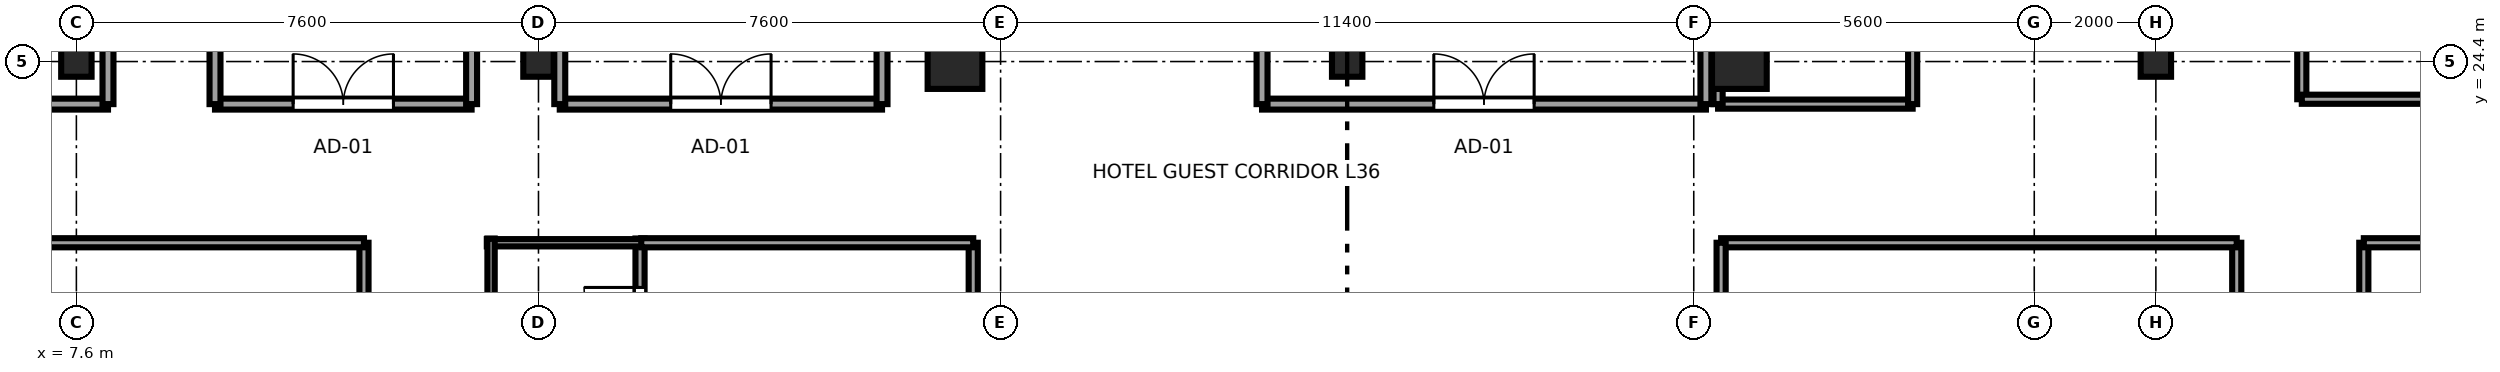
"""IFC4 building model, lengths in metres.
Left out: names, types, materials, properties, quantities, classifications, styles, units other than length and angle.
Written with IfcOpenShell. Run it as: python <this file> out.ifc"""

import sys

from ifc_helpers import new_model, si_unit, direction, frame, frame_2d, origin, origin_2d, place, context, subcontext, project, spatial, rectangle, i_section, extrude, source, transform, mapped, element, fill, save


model = new_model("IFC4")
c1 = context("Model", 3, precision=1e-05, world=origin(), true_north=direction((0.0, 1.0)))
c2 = subcontext(c1, "Body", "Model", "MODEL_VIEW")
j1 = project(units=[si_unit("LENGTHUNIT", "METRE"), si_unit("PLANEANGLEUNIT", "RADIAN")], contexts=[c1])
p1 = place(None, origin())
s1 = spatial("IfcSite", under=j1, at=p1, CompositionType="ELEMENT")
p2 = place(p1, origin())
s2 = spatial("IfcBuilding", under=s1, at=p2, CompositionType="ELEMENT")
p3 = place(p2, frame((0.0, 0.0, 139.95)))
s3 = spatial("IfcBuildingStorey", under=s2, at=p3, CompositionType="ELEMENT", Elevation=139.95)
m1 = source(origin(), c2, "Body", "SweptSolid", [
    extrude(i_section(OverallWidth=0.5, OverallDepth=0.5, WebThickness=0.022, FlangeThickness=0.034, at=origin_2d()), origin(), (0.0, 0.0, 1.0), 3.55),
])
for number, where, z_axis, x_axis in (
    (1, (7.6, 24.4, 0.0), (0.0, 0.0, 1.0), (1.0, 0.0, 0.0)),
    (2, (15.2, 24.4, 0.0), (0.0, 0.0, 1.0), (1.0, 0.0, 0.0)),
):
    element("IfcColumn", number, at=place(p3, frame(where, z_axis=z_axis, x_axis=x_axis)), inside=s3, PredefinedType="COLUMN", context=c2, shape_type="MappedRepresentation", body=[
        mapped(m1, transform((0.0, 0.0, 0.0), x_axis=(1.0, 0.0, 0.0), y_axis=(0.0, 1.0, 0.0), z_axis=(0.0, 0.0, 1.0), scale=1.0)),
    ])
m2 = source(origin(), c2, "Body", "SweptSolid", [
    extrude(rectangle(XDim=0.9, YDim=0.9, at=origin_2d()), origin(), (0.0, 0.0, 1.0), 3.55),
])
for number, where, z_axis, x_axis in (
    (3, (22.05, 24.4, 0.0), (0.0, 0.0, 1.0), (1.0, 0.0, 0.0)),
    (4, (34.95, 24.4, 0.0), (0.0, 0.0, 1.0), (1.0, 0.0, 0.0)),
):
    element("IfcColumn", number, at=place(p3, frame(where, z_axis=z_axis, x_axis=x_axis)), inside=s3, PredefinedType="COLUMN", context=c2, shape_type="MappedRepresentation", body=[
        mapped(m2, transform((0.0, 0.0, 0.0), x_axis=(1.0, 0.0, 0.0), y_axis=(0.0, 1.0, 0.0), z_axis=(0.0, 0.0, 1.0), scale=1.0)),
    ])
for number, where, z_axis, x_axis in (
    (5, (41.8, 24.4, 0.0), (0.0, 0.0, 1.0), (1.0, 0.0, 0.0)),
    (6, (28.5, 24.4, 0.0), (0.0, 0.0, 1.0), (1.0, 0.0, 0.0)),
):
    element("IfcColumn", number, at=place(p3, frame(where, z_axis=z_axis, x_axis=x_axis)), inside=s3, PredefinedType="COLUMN", context=c2, shape_type="MappedRepresentation", body=[
        mapped(m1, transform((0.0, 0.0, 0.0), x_axis=(1.0, 0.0, 0.0), y_axis=(0.0, 1.0, 0.0), z_axis=(0.0, 0.0, 1.0), scale=1.0)),
    ])
p4 = place(p3, frame((16.87, 19.1, 0.0), z_axis=(0.0, 0.0, 1.0), x_axis=(0.0, 1.0, 0.0)))
e7 = element("IfcWall", 7, at=p4, inside=s3, PredefinedType="PARTITIONING", context=c2, shape_type="SweptSolid", body=[
    extrude(rectangle(XDim=2.39, YDim=0.15, at=frame_2d((1.195, 0.0))), origin(), (0.0, 0.0, 1.0), 3.37),
])
p5 = place(p4, frame((0.665, 0.0, 0.0)))
e8 = element("IfcOpeningElement", 8, at=p5, cuts=e7, PredefinedType="OPENING", context=c2, shape_type="SweptSolid", body=[
    extrude(rectangle(XDim=0.92, YDim=2.01, at=frame_2d((0.46, 1.005))), frame((0.0, 0.085, 0.0), z_axis=(0.0, -1.0, 0.0), x_axis=(1.0, 0.0, 0.0)), (0.0, 0.0, 1.0), 0.17),
])
p6 = place(p3, frame((14.35, 21.42, 0.0), z_axis=(0.0, 0.0, 1.0), x_axis=(1.0, 0.0, 0.0)))
e9 = element("IfcWall", 9, at=p6, inside=s3, PredefinedType="PLUMBINGWALL", context=c2, shape_type="SweptSolid", body=[
    extrude(rectangle(XDim=2.59, YDim=0.12, at=frame_2d((1.295, 0.0))), origin(), (0.0, 0.0, 1.0), 3.37),
])
p7 = place(p3, frame((14.42, 19.1, 0.0), z_axis=(0.0, 0.0, 1.0), x_axis=(0.0, 1.0, 0.0)))
e10 = element("IfcWall", 10, at=p7, inside=s3, PredefinedType="PLUMBINGWALL", context=c2, shape_type="SweptSolid", body=[
    extrude(rectangle(XDim=2.39, YDim=0.12, at=frame_2d((1.195, 0.0))), origin(), (0.0, 0.0, 1.0), 3.37),
])
p8 = place(p3, frame((12.33, 13.21, 0.0), z_axis=(0.0, 0.0, 1.0), x_axis=(0.0, 1.0, 0.0)))
e11 = element("IfcWall", 11, at=p8, inside=s3, PredefinedType="PARTITIONING", context=c2, shape_type="SweptSolid", body=[
    extrude(rectangle(XDim=8.21, YDim=0.15, at=frame_2d((4.105, 0.0))), origin(), (0.0, 0.0, 1.0), 3.37),
])
p9 = place(p8, frame((3.595, 0.0, 0.0)))
e12 = element("IfcOpeningElement", 12, at=p9, cuts=e11, PredefinedType="OPENING", context=c2, shape_type="SweptSolid", body=[
    extrude(rectangle(XDim=0.98, YDim=2.12, at=frame_2d((0.49, 1.06))), frame((0.0, 0.085, 0.0), z_axis=(0.0, -1.0, 0.0), x_axis=(1.0, 0.0, 0.0)), (0.0, 0.0, 1.0), 0.17),
])
p10 = place(p3, frame((0.405, 21.42, 0.0), z_axis=(0.0, 0.0, 1.0), x_axis=(1.0, 0.0, 0.0)))
e13 = element("IfcWall", 13, at=p10, inside=s3, PredefinedType="PARTITIONING", context=c2, shape_type="SweptSolid", body=[
    extrude(rectangle(XDim=11.925, YDim=0.15, at=frame_2d((5.962, 0.0))), origin(), (0.0, 0.0, 1.0), 3.37),
])
p11 = place(p3, frame((22.35, 14.48, 0.0), z_axis=(0.0, 0.0, 1.0), x_axis=(0.0, 1.0, 0.0)))
e14 = element("IfcWall", 14, at=p11, inside=s3, PredefinedType="PARTITIONING", context=c2, shape_type="SweptSolid", body=[
    extrude(rectangle(XDim=6.94, YDim=0.15, at=frame_2d((3.47, 0.0))), origin(), (0.0, 0.0, 1.0), 3.37),
])
p12 = place(p3, frame((16.89, 21.42, 0.0), z_axis=(0.0, 0.0, 1.0), x_axis=(1.0, 0.0, 0.0)))
e15 = element("IfcWall", 15, at=p12, inside=s3, PredefinedType="PARTITIONING", context=c2, shape_type="SweptSolid", body=[
    extrude(rectangle(XDim=5.46, YDim=0.15, at=frame_2d((2.73, 0.0))), origin(), (0.0, 0.0, 1.0), 3.37),
])
p13 = place(p3, frame((43.13, 13.21, 0.0), z_axis=(0.0, 0.0, 1.0), x_axis=(0.0, 1.0, 0.0)))
e16 = element("IfcWall", 16, at=p13, inside=s3, PredefinedType="PARTITIONING", context=c2, shape_type="SweptSolid", body=[
    extrude(rectangle(XDim=8.21, YDim=0.15, at=frame_2d((4.105, 0.0))), origin(), (0.0, 0.0, 1.0), 3.37),
])
p14 = place(p13, frame((3.595, 0.0, 0.0)))
e17 = element("IfcOpeningElement", 17, at=p14, cuts=e16, PredefinedType="OPENING", context=c2, shape_type="SweptSolid", body=[
    extrude(rectangle(XDim=0.98, YDim=2.12, at=frame_2d((0.49, 1.06))), frame((0.0, 0.085, 0.0), z_axis=(0.0, -1.0, 0.0), x_axis=(1.0, 0.0, 0.0)), (0.0, 0.0, 1.0), 0.17),
])
p15 = place(p3, frame((34.65, 21.42, 0.0), z_axis=(0.0, 0.0, 1.0), x_axis=(1.0, 0.0, 0.0)))
e18 = element("IfcWall", 18, at=p15, inside=s3, PredefinedType="PARTITIONING", context=c2, shape_type="SweptSolid", body=[
    extrude(rectangle(XDim=8.48, YDim=0.15, at=frame_2d((4.24, 0.0))), origin(), (0.0, 0.0, 1.0), 3.37),
])
p16 = place(p3, frame((34.65, 10.88, 0.0), z_axis=(0.0, 0.0, 1.0), x_axis=(0.0, 1.0, 0.0)))
e19 = element("IfcWall", 19, at=p16, inside=s3, PredefinedType="PARTITIONING", context=c2, shape_type="SweptSolid", body=[
    extrude(rectangle(XDim=10.54, YDim=0.15, at=frame_2d((5.27, 0.0))), origin(), (0.0, 0.0, 1.0), 3.37),
])
p17 = place(p3, frame((45.22, 16.81, 0.0), z_axis=(0.0, 0.0, 1.0), x_axis=(0.0, 1.0, 0.0)))
e20 = element("IfcWall", 20, at=p17, inside=s3, PredefinedType="PARTITIONING", context=c2, shape_type="SweptSolid", body=[
    extrude(rectangle(XDim=4.61, YDim=0.15, at=frame_2d((2.305, 0.0))), origin(), (0.0, 0.0, 1.0), 3.37),
])
p18 = place(p17, frame((1.795, 0.0, 0.0)))
e21 = element("IfcOpeningElement", 21, at=p18, cuts=e20, PredefinedType="OPENING", context=c2, shape_type="SweptSolid", body=[
    extrude(rectangle(XDim=0.98, YDim=2.12, at=frame_2d((0.49, 1.06))), frame((0.0, 0.085, 0.0), z_axis=(0.0, -1.0, 0.0), x_axis=(1.0, 0.0, 0.0)), (0.0, 0.0, 1.0), 0.17),
])
p19 = place(p3, frame((45.22, 21.42, 0.0), z_axis=(0.0, 0.0, 1.0), x_axis=(1.0, 0.0, 0.0)))
e22 = element("IfcWall", 22, at=p19, inside=s3, PredefinedType="PARTITIONING", context=c2, shape_type="SweptSolid", body=[
    extrude(rectangle(XDim=11.375, YDim=0.15, at=frame_2d((5.688, 0.0))), origin(), (0.0, 0.0, 1.0), 3.37),
])
p20 = place(p3, frame((0.405, 23.7, 0.0), z_axis=(0.0, 0.0, 1.0), x_axis=(1.0, 0.0, 0.0)))
e23 = element("IfcWall", 23, at=p20, inside=s3, PredefinedType="PARTITIONING", context=c2, shape_type="SweptSolid", body=[
    extrude(rectangle(XDim=7.715, YDim=0.18, at=frame_2d((3.857, 0.0))), origin(), (0.0, 0.0, 1.0), 3.37),
])
p21 = place(p3, frame((8.12, 23.7, 0.0), z_axis=(0.0, 0.0, 1.0), x_axis=(0.0, 1.0, 0.0)))
e24 = element("IfcWall", 24, at=p21, inside=s3, PredefinedType="PARTITIONING", context=c2, shape_type="SweptSolid", body=[
    extrude(rectangle(XDim=7.5, YDim=0.18, at=frame_2d((3.75, 0.0))), origin(), (0.0, 0.0, 1.0), 3.37),
])
p22 = place(p21, frame((2.925, 0.0, 0.0)))
e25 = element("IfcOpeningElement", 25, at=p22, cuts=e24, PredefinedType="OPENING", context=c2, shape_type="SweptSolid", body=[
    extrude(rectangle(XDim=1.65, YDim=2.15, at=frame_2d((0.825, 1.075))), frame((0.0, 0.1, 0.0), z_axis=(0.0, -1.0, 0.0), x_axis=(1.0, 0.0, 0.0)), (0.0, 0.0, 1.0), 0.2),
])
p23 = place(p3, frame((44.2, 23.78, 0.0), z_axis=(0.0, 0.0, 1.0), x_axis=(0.0, 1.0, 0.0)))
e26 = element("IfcWall", 26, at=p23, inside=s3, PredefinedType="PARTITIONING", context=c2, shape_type="SweptSolid", body=[
    extrude(rectangle(XDim=7.34, YDim=0.15, at=frame_2d((3.67, 0.0))), origin(), (0.0, 0.0, 1.0), 3.37),
])
p24 = place(p23, frame((3.18, 0.0, 0.0)))
e27 = element("IfcOpeningElement", 27, at=p24, cuts=e26, PredefinedType="OPENING", context=c2, shape_type="SweptSolid", body=[
    extrude(rectangle(XDim=0.98, YDim=2.12, at=frame_2d((0.49, 1.06))), frame((0.0, 0.085, 0.0), z_axis=(0.0, -1.0, 0.0), x_axis=(1.0, 0.0, 0.0)), (0.0, 0.0, 1.0), 0.17),
])
p25 = place(p3, frame((44.2, 23.78, 0.0), z_axis=(0.0, 0.0, 1.0), x_axis=(1.0, 0.0, 0.0)))
e28 = element("IfcWall", 28, at=p25, inside=s3, PredefinedType="PARTITIONING", context=c2, shape_type="SweptSolid", body=[
    extrude(rectangle(XDim=12.395, YDim=0.15, at=frame_2d((6.198, 0.0))), origin(), (0.0, 0.0, 1.0), 3.37),
])
p26 = place(p3, frame((9.88, 23.7, 0.0), z_axis=(0.0, 0.0, 1.0), x_axis=(1.0, 0.0, 0.0)))
e29 = element("IfcWall", 29, at=p26, inside=s3, PredefinedType="PARTITIONING", context=c2, shape_type="SweptSolid", body=[
    extrude(rectangle(XDim=4.22, YDim=0.18, at=frame_2d((2.11, 0.0))), origin(), (0.0, 0.0, 1.0), 3.37),
])
p27 = place(p26, frame((1.285, 0.0, 0.0)))
e30 = element("IfcOpeningElement", 30, at=p27, cuts=e29, PredefinedType="OPENING", context=c2, shape_type="SweptSolid", body=[
    extrude(rectangle(XDim=1.65, YDim=2.15, at=frame_2d((0.825, 1.075))), frame((0.0, 0.1, 0.0), z_axis=(0.0, -1.0, 0.0), x_axis=(1.0, 0.0, 0.0)), (0.0, 0.0, 1.0), 0.2),
])
for number, where, z_axis, x_axis in (
    (31, (9.88, 23.7, 0.0), (0.0, 0.0, 1.0), (0.0, 1.0, 0.0)),
    (32, (14.1, 23.7, 0.0), (0.0, 0.0, 1.0), (0.0, 1.0, 0.0)),
):
    element("IfcWall", number, at=place(p3, frame(where, z_axis=z_axis, x_axis=x_axis)), inside=s3, PredefinedType="PARTITIONING", context=c2, shape_type="SweptSolid", body=[
        extrude(rectangle(XDim=6.05, YDim=0.18, at=frame_2d((3.025, 0.0))), origin(), (0.0, 0.0, 1.0), 3.37),
    ])
p28 = place(p3, frame((27.1, 23.7, 0.0), z_axis=(0.0, 0.0, 1.0), x_axis=(1.0, 0.0, 0.0)))
e33 = element("IfcWall", 33, at=p28, inside=s3, PredefinedType="PARTITIONING", context=c2, shape_type="SweptSolid", body=[
    extrude(rectangle(XDim=7.3, YDim=0.18, at=frame_2d((3.65, 0.0))), origin(), (0.0, 0.0, 1.0), 3.37),
])
p29 = place(p28, frame((2.825, 0.0, 0.0)))
e34 = element("IfcOpeningElement", 34, at=p29, cuts=e33, PredefinedType="OPENING", context=c2, shape_type="SweptSolid", body=[
    extrude(rectangle(XDim=1.65, YDim=2.15, at=frame_2d((0.825, 1.075))), frame((0.0, 0.1, 0.0), z_axis=(0.0, -1.0, 0.0), x_axis=(1.0, 0.0, 0.0)), (0.0, 0.0, 1.0), 0.2),
])
for number, where, z_axis, x_axis in (
    (35, (27.1, 23.7, 0.0), (0.0, 0.0, 1.0), (0.0, 1.0, 0.0)),
    (36, (34.4, 23.7, 0.0), (0.0, 0.0, 1.0), (0.0, 1.0, 0.0)),
):
    element("IfcWall", number, at=place(p3, frame(where, z_axis=z_axis, x_axis=x_axis)), inside=s3, PredefinedType="PARTITIONING", context=c2, shape_type="SweptSolid", body=[
        extrude(rectangle(XDim=6.1, YDim=0.18, at=frame_2d((3.05, 0.0))), origin(), (0.0, 0.0, 1.0), 3.37),
    ])
p30 = place(p3, frame((15.55, 23.7, 0.0), z_axis=(0.0, 0.0, 1.0), x_axis=(1.0, 0.0, 0.0)))
e37 = element("IfcWall", 37, at=p30, inside=s3, PredefinedType="PARTITIONING", context=c2, shape_type="SweptSolid", body=[
    extrude(rectangle(XDim=5.3, YDim=0.18, at=frame_2d((2.65, 0.0))), origin(), (0.0, 0.0, 1.0), 3.37),
])
p31 = place(p30, frame((1.825, 0.0, 0.0)))
e38 = element("IfcOpeningElement", 38, at=p31, cuts=e37, PredefinedType="OPENING", context=c2, shape_type="SweptSolid", body=[
    extrude(rectangle(XDim=1.65, YDim=2.15, at=frame_2d((0.825, 1.075))), frame((0.0, 0.1, 0.0), z_axis=(0.0, -1.0, 0.0), x_axis=(1.0, 0.0, 0.0)), (0.0, 0.0, 1.0), 0.2),
])
for number, where, z_axis, x_axis in (
    (39, (15.55, 23.7, 0.0), (0.0, 0.0, 1.0), (0.0, 1.0, 0.0)),
    (40, (20.85, 23.7, 0.0), (0.0, 0.0, 1.0), (0.0, 1.0, 0.0)),
):
    element("IfcWall", number, at=place(p3, frame(where, z_axis=z_axis, x_axis=x_axis)), inside=s3, PredefinedType="PARTITIONING", context=c2, shape_type="SweptSolid", body=[
        extrude(rectangle(XDim=6.1, YDim=0.18, at=frame_2d((3.05, 0.0))), origin(), (0.0, 0.0, 1.0), 3.37),
    ])
p32 = place(p3, frame((34.6, 23.7, 0.0), z_axis=(0.0, 0.0, 1.0), x_axis=(1.0, 0.0, 0.0)))
e41 = element("IfcWall", 41, at=p32, inside=s3, PredefinedType="PARTITIONING", context=c2, shape_type="SweptSolid", body=[
    extrude(rectangle(XDim=3.2, YDim=0.15, at=frame_2d((1.6, 0.0))), origin(), (0.0, 0.0, 1.0), 3.37),
])
for number, where, z_axis, x_axis in (
    (42, (34.6, 23.7, 0.0), (0.0, 0.0, 1.0), (0.0, 1.0, 0.0)),
    (43, (37.8, 23.7, 0.0), (0.0, 0.0, 1.0), (0.0, 1.0, 0.0)),
):
    element("IfcWall", number, at=place(p3, frame(where, z_axis=z_axis, x_axis=x_axis)), inside=s3, PredefinedType="PARTITIONING", context=c2, shape_type="SweptSolid", body=[
        extrude(rectangle(XDim=5.7, YDim=0.15, at=frame_2d((2.85, 0.0))), origin(), (0.0, 0.0, 1.0), 3.37),
    ])
m3 = source(origin(), c2, "Body", "SweptSolid", [
    extrude(rectangle(XDim=0.92, YDim=2.01, at=frame_2d((0.46, 1.005))), frame((0.0, 0.025, 0.0), z_axis=(0.0, -1.0, 0.0), x_axis=(1.0, 0.0, 0.0)), (0.0, 0.0, 1.0), 0.05),
])
p33 = place(p5, origin())
e44 = element("IfcDoor", 44, at=p33, inside=s3, OperationType="SINGLE_SWING_RIGHT", PredefinedType="DOOR", context=c2, shape_type="MappedRepresentation", body=[
    mapped(m3, transform((0.0, 0.0, 0.0), x_axis=(1.0, 0.0, 0.0), y_axis=(0.0, 1.0, 0.0), z_axis=(0.0, 0.0, 1.0), scale=1.0)),
])
fill(e8, e44)
m4 = source(origin(), c2, "Body", "SweptSolid", [
    extrude(rectangle(XDim=1.65, YDim=2.15, at=frame_2d((0.825, 1.075))), frame((0.0, 0.025, 0.0), z_axis=(0.0, -1.0, 0.0), x_axis=(1.0, 0.0, 0.0)), (0.0, 0.0, 1.0), 0.05),
])
p34 = place(p27, origin())
e45 = element("IfcDoor", 45, at=p34, inside=s3, OperationType="DOUBLE_DOOR_SINGLE_SWING", PredefinedType="DOOR", context=c2, shape_type="MappedRepresentation", body=[
    mapped(m4, transform((0.0, 0.0, 0.0), x_axis=(1.0, 0.0, 0.0), y_axis=(0.0, 1.0, 0.0), z_axis=(0.0, 0.0, 1.0), scale=1.0)),
])
fill(e30, e45)
p35 = place(p29, origin())
e46 = element("IfcDoor", 46, at=p35, inside=s3, OperationType="DOUBLE_DOOR_SINGLE_SWING", PredefinedType="DOOR", context=c2, shape_type="MappedRepresentation", body=[
    mapped(m4, transform((0.0, 0.0, 0.0), x_axis=(1.0, 0.0, 0.0), y_axis=(0.0, 1.0, 0.0), z_axis=(0.0, 0.0, 1.0), scale=1.0)),
])
fill(e34, e46)
p36 = place(p31, origin())
e47 = element("IfcDoor", 47, at=p36, inside=s3, OperationType="DOUBLE_DOOR_SINGLE_SWING", PredefinedType="DOOR", context=c2, shape_type="MappedRepresentation", body=[
    mapped(m4, transform((0.0, 0.0, 0.0), x_axis=(1.0, 0.0, 0.0), y_axis=(0.0, 1.0, 0.0), z_axis=(0.0, 0.0, 1.0), scale=1.0)),
])
fill(e38, e47)
save(model, sys.argv[1])
